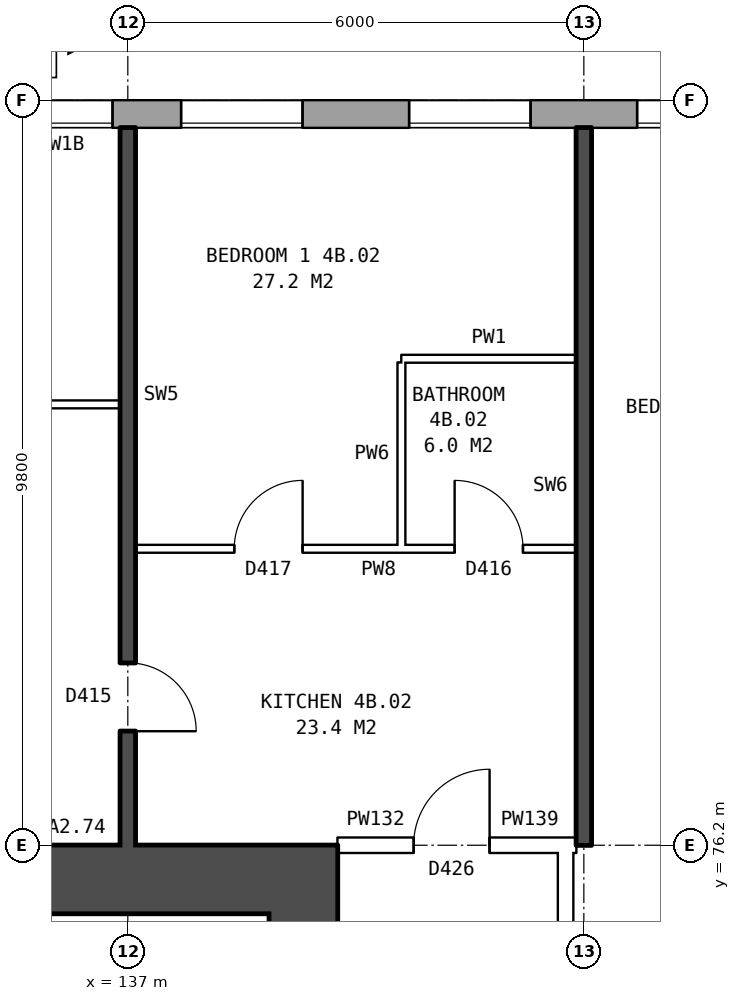
"""IFC4 building model, lengths in metres.
Left out: names, types, materials, properties, quantities, classifications, styles, units other than length and angle.
Written with IfcOpenShell. Run it as: python <this file> out.ifc"""

import sys

from ifc_helpers import new_model, si_unit, direction, frame, frame_2d, origin, place, context, subcontext, project, spatial, rectangle, extrude, element, fill, save


model = new_model("IFC4")
c1 = context("Model", 3, precision=1e-05, world=origin(), true_north=direction((0.0, 1.0)))
c2 = subcontext(c1, "Body", "Model", "MODEL_VIEW")
j1 = project(units=[si_unit("LENGTHUNIT", "METRE"), si_unit("PLANEANGLEUNIT", "RADIAN")], contexts=[c1])
p1 = place(None, origin())
s1 = spatial("IfcSite", under=j1, at=p1, CompositionType="ELEMENT")
p2 = place(p1, origin())
s2 = spatial("IfcBuilding", under=s1, at=p2, CompositionType="ELEMENT")
p3 = place(p2, frame((0.0, 0.0, 19.5)))
s3 = spatial("IfcBuildingStorey", under=s2, at=p3, CompositionType="ELEMENT", Elevation=19.5)
p4 = place(p3, frame((174.675, 85.82, 0.0), z_axis=(0.0, 0.0, 1.0), x_axis=(-1.0, 0.0, 0.0)))
e1 = element("IfcWall", 1, at=p4, inside=s3, PredefinedType="STANDARD", context=c2, shape_type="SweptSolid", body=[
    extrude(rectangle(XDim=40.601, YDim=0.36, at=frame_2d((20.3, 0.0))), origin(), (0.0, 0.0, 1.0), 2.85),
])
p5 = place(p4, frame((2.375, 0.0, 0.8)))
e2 = element("IfcOpeningElement", 2, at=p5, cuts=e1, PredefinedType="OPENING", context=c2, shape_type="SweptSolid", body=[
    extrude(rectangle(XDim=1.6, YDim=1.8, at=frame_2d((0.8, 0.9))), frame((0.0, 0.19, 0.0), z_axis=(0.0, -1.0, 0.0), x_axis=(1.0, 0.0, 0.0)), (0.0, 0.0, 1.0), 0.38),
])
p6 = place(p4, frame((5.375, 0.0, 0.8)))
e3 = element("IfcOpeningElement", 3, at=p6, cuts=e1, PredefinedType="OPENING", context=c2, shape_type="SweptSolid", body=[
    extrude(rectangle(XDim=1.6, YDim=1.8, at=frame_2d((0.8, 0.9))), frame((0.0, 0.19, 0.0), z_axis=(0.0, -1.0, 0.0), x_axis=(1.0, 0.0, 0.0)), (0.0, 0.0, 1.0), 0.38),
])
p7 = place(p4, frame((8.375, 0.0, 0.8)))
e4 = element("IfcOpeningElement", 4, at=p7, cuts=e1, PredefinedType="OPENING", context=c2, shape_type="SweptSolid", body=[
    extrude(rectangle(XDim=1.6, YDim=1.8, at=frame_2d((0.8, 0.9))), frame((0.0, 0.19, 0.0), z_axis=(0.0, -1.0, 0.0), x_axis=(1.0, 0.0, 0.0)), (0.0, 0.0, 1.0), 0.38),
])
p8 = place(p4, frame((11.375, 0.0, 0.8)))
e5 = element("IfcOpeningElement", 5, at=p8, cuts=e1, PredefinedType="OPENING", context=c2, shape_type="SweptSolid", body=[
    extrude(rectangle(XDim=1.6, YDim=1.8, at=frame_2d((0.8, 0.9))), frame((0.0, 0.19, 0.0), z_axis=(0.0, -1.0, 0.0), x_axis=(1.0, 0.0, 0.0)), (0.0, 0.0, 1.0), 0.38),
])
p9 = place(p4, frame((14.375, 0.0, 0.8)))
e6 = element("IfcOpeningElement", 6, at=p9, cuts=e1, PredefinedType="OPENING", context=c2, shape_type="SweptSolid", body=[
    extrude(rectangle(XDim=1.6, YDim=1.8, at=frame_2d((0.8, 0.9))), frame((0.0, 0.19, 0.0), z_axis=(0.0, -1.0, 0.0), x_axis=(1.0, 0.0, 0.0)), (0.0, 0.0, 1.0), 0.38),
])
p10 = place(p4, frame((17.375, 0.0, 0.8)))
e7 = element("IfcOpeningElement", 7, at=p10, cuts=e1, PredefinedType="OPENING", context=c2, shape_type="SweptSolid", body=[
    extrude(rectangle(XDim=1.6, YDim=1.8, at=frame_2d((0.8, 0.9))), frame((0.0, 0.19, 0.0), z_axis=(0.0, -1.0, 0.0), x_axis=(1.0, 0.0, 0.0)), (0.0, 0.0, 1.0), 0.38),
])
p11 = place(p4, frame((20.375, 0.0, 0.8)))
e8 = element("IfcOpeningElement", 8, at=p11, cuts=e1, PredefinedType="OPENING", context=c2, shape_type="SweptSolid", body=[
    extrude(rectangle(XDim=1.6, YDim=1.8, at=frame_2d((0.8, 0.9))), frame((0.0, 0.19, 0.0), z_axis=(0.0, -1.0, 0.0), x_axis=(1.0, 0.0, 0.0)), (0.0, 0.0, 1.0), 0.38),
])
p12 = place(p4, frame((23.375, 0.0, 0.8)))
e9 = element("IfcOpeningElement", 9, at=p12, cuts=e1, PredefinedType="OPENING", context=c2, shape_type="SweptSolid", body=[
    extrude(rectangle(XDim=1.6, YDim=1.8, at=frame_2d((0.8, 0.9))), frame((0.0, 0.19, 0.0), z_axis=(0.0, -1.0, 0.0), x_axis=(1.0, 0.0, 0.0)), (0.0, 0.0, 1.0), 0.38),
])
p13 = place(p4, frame((26.375, 0.0, 0.8)))
e10 = element("IfcOpeningElement", 10, at=p13, cuts=e1, PredefinedType="OPENING", context=c2, shape_type="SweptSolid", body=[
    extrude(rectangle(XDim=1.6, YDim=1.8, at=frame_2d((0.8, 0.9))), frame((0.0, 0.19, 0.0), z_axis=(0.0, -1.0, 0.0), x_axis=(1.0, 0.0, 0.0)), (0.0, 0.0, 1.0), 0.38),
])
p14 = place(p4, frame((29.375, 0.0, 0.8)))
e11 = element("IfcOpeningElement", 11, at=p14, cuts=e1, PredefinedType="OPENING", context=c2, shape_type="SweptSolid", body=[
    extrude(rectangle(XDim=1.6, YDim=1.8, at=frame_2d((0.8, 0.9))), frame((0.0, 0.19, 0.0), z_axis=(0.0, -1.0, 0.0), x_axis=(1.0, 0.0, 0.0)), (0.0, 0.0, 1.0), 0.38),
])
p15 = place(p4, frame((32.375, 0.0, 0.8)))
e12 = element("IfcOpeningElement", 12, at=p15, cuts=e1, PredefinedType="OPENING", context=c2, shape_type="SweptSolid", body=[
    extrude(rectangle(XDim=1.6, YDim=1.8, at=frame_2d((0.8, 0.9))), frame((0.0, 0.19, 0.0), z_axis=(0.0, -1.0, 0.0), x_axis=(1.0, 0.0, 0.0)), (0.0, 0.0, 1.0), 0.38),
])
p16 = place(p4, frame((35.375, 0.0, 0.8)))
e13 = element("IfcOpeningElement", 13, at=p16, cuts=e1, PredefinedType="OPENING", context=c2, shape_type="SweptSolid", body=[
    extrude(rectangle(XDim=1.6, YDim=1.8, at=frame_2d((0.8, 0.9))), frame((0.0, 0.19, 0.0), z_axis=(0.0, -1.0, 0.0), x_axis=(1.0, 0.0, 0.0)), (0.0, 0.0, 1.0), 0.38),
])
p17 = place(p4, frame((37.875, 0.0, 0.8)))
e14 = element("IfcOpeningElement", 14, at=p17, cuts=e1, PredefinedType="OPENING", context=c2, shape_type="SweptSolid", body=[
    extrude(rectangle(XDim=1.2, YDim=1.8, at=frame_2d((0.6, 0.9))), frame((0.0, 0.19, 0.0), z_axis=(0.0, -1.0, 0.0), x_axis=(1.0, 0.0, 0.0)), (0.0, 0.0, 1.0), 0.38),
])
p18 = place(p4, frame((39.375, 0.0, 0.8)))
e15 = element("IfcOpeningElement", 15, at=p18, cuts=e1, PredefinedType="OPENING", context=c2, shape_type="SweptSolid", body=[
    extrude(rectangle(XDim=0.6, YDim=1.2, at=frame_2d((0.3, 0.6))), frame((0.0, 0.19, 0.0), z_axis=(0.0, -1.0, 0.0), x_axis=(1.0, 0.0, 0.0)), (0.0, 0.0, 1.0), 0.38),
])
p19 = place(p3, frame((139.31, 64.7, 0.0), z_axis=(0.0, 0.0, 1.0), x_axis=(0.0, 1.0, 0.0)))
e16 = element("IfcWall", 16, at=p19, inside=s3, PredefinedType="SHEAR", context=c2, shape_type="SweptSolid", body=[
    extrude(rectangle(XDim=10.6, YDim=0.9, at=frame_2d((5.3, 0.0))), origin(), (0.0, 0.0, 1.0), 2.85),
])
p20 = place(p19, frame((0.425, 0.0, 0.0)))
e17 = element("IfcOpeningElement", 17, at=p20, cuts=e16, PredefinedType="OPENING", context=c2, shape_type="SweptSolid", body=[
    extrude(rectangle(XDim=1.1, YDim=2.1, at=frame_2d((0.55, 1.05))), frame((0.0, 0.46, 0.0), z_axis=(0.0, -1.0, 0.0), x_axis=(1.0, 0.0, 0.0)), (0.0, 0.0, 1.0), 0.92),
])
p21 = place(p19, frame((9.0, 0.0, 0.0)))
e18 = element("IfcOpeningElement", 18, at=p21, cuts=e16, PredefinedType="OPENING", context=c2, shape_type="SweptSolid", body=[
    extrude(rectangle(XDim=1.1, YDim=2.1, at=frame_2d((0.55, 1.05))), frame((0.0, 0.46, 0.0), z_axis=(0.0, -1.0, 0.0), x_axis=(1.0, 0.0, 0.0)), (0.0, 0.0, 1.0), 0.92),
])
p22 = place(p19, frame((7.225, 0.0, 0.0)))
e19 = element("IfcOpeningElement", 19, at=p22, cuts=e16, PredefinedType="OPENING", context=c2, shape_type="SweptSolid", body=[
    extrude(rectangle(XDim=0.85, YDim=2.1, at=frame_2d((0.425, 1.05))), frame((0.0, 0.46, 0.0), z_axis=(0.0, -1.0, 0.0), x_axis=(1.0, 0.0, 0.0)), (0.0, 0.0, 1.0), 0.92),
])
p23 = place(p3, frame((139.76, 75.75, 0.0), z_axis=(0.0, 0.0, 1.0), x_axis=(-1.0, 0.0, 0.0)))
e20 = element("IfcWall", 20, at=p23, inside=s3, PredefinedType="SHEAR", context=c2, shape_type="SweptSolid", body=[
    extrude(rectangle(XDim=8.4, YDim=0.9, at=frame_2d((4.2, 0.0))), origin(), (0.0, 0.0, 1.0), 2.85),
])
p24 = place(p3, frame((142.76, 63.9, 0.0), z_axis=(0.0, 0.0, 1.0), x_axis=(0.0, 1.0, 0.0)))
e21 = element("IfcWall", 21, at=p24, inside=s3, PredefinedType="PARTITIONING", context=c2, shape_type="SweptSolid", body=[
    extrude(rectangle(XDim=12.2, YDim=0.2, at=frame_2d((6.1, 0.0))), origin(), (0.0, 0.0, 1.0), 2.85),
])
p25 = place(p24, frame((5.1, 0.0, 0.0)))
e22 = element("IfcOpeningElement", 22, at=p25, cuts=e21, PredefinedType="OPENING", context=c2, shape_type="SweptSolid", body=[
    extrude(rectangle(XDim=2.0, YDim=2.1, at=frame_2d((1.0, 1.05))), frame((0.0, 0.11, 0.0), z_axis=(0.0, -1.0, 0.0), x_axis=(1.0, 0.0, 0.0)), (0.0, 0.0, 1.0), 0.22),
])
p26 = place(p3, frame((139.76, 76.2, 0.0), z_axis=(0.0, 0.0, 1.0), x_axis=(1.0, 0.0, 0.0)))
e23 = element("IfcWall", 23, at=p26, inside=s3, PredefinedType="PARTITIONING", context=c2, shape_type="SweptSolid", body=[
    extrude(rectangle(XDim=3.0, YDim=0.2, at=frame_2d((1.5, 0.0))), origin(), (0.0, 0.0, 1.0), 2.85),
])
p27 = place(p26, frame((1.0, 0.0, 0.0)))
e24 = element("IfcOpeningElement", 24, at=p27, cuts=e23, PredefinedType="OPENING", context=c2, shape_type="SweptSolid", body=[
    extrude(rectangle(XDim=1.0, YDim=2.1, at=frame_2d((0.5, 1.05))), frame((0.0, 0.11, 0.0), z_axis=(0.0, -1.0, 0.0), x_axis=(1.0, 0.0, 0.0)), (0.0, 0.0, 1.0), 0.22),
])
p28 = place(p3, frame((142.76, 76.2, 0.0), z_axis=(0.0, 0.0, 1.0), x_axis=(1.0, 0.0, 0.0)))
e25 = element("IfcWall", 25, at=p28, inside=s3, PredefinedType="PARTITIONING", context=c2, shape_type="SweptSolid", body=[
    extrude(rectangle(XDim=0.14, YDim=0.2, at=frame_2d((0.07, 0.0))), origin(), (0.0, 0.0, 1.0), 2.85),
])
p29 = place(p3, frame((137.1, 80.1, 0.0), z_axis=(0.0, 0.0, 1.0), x_axis=(1.0, 0.0, 0.0)))
e26 = element("IfcWall", 26, at=p29, inside=s3, PredefinedType="PARTITIONING", context=c2, shape_type="SweptSolid", body=[
    extrude(rectangle(XDim=5.8, YDim=0.1, at=frame_2d((2.9, 0.0))), origin(), (0.0, 0.0, 1.0), 2.85),
])
p30 = place(p29, frame((1.3, 0.0, 0.0)))
e27 = element("IfcOpeningElement", 27, at=p30, cuts=e26, PredefinedType="OPENING", context=c2, shape_type="SweptSolid", body=[
    extrude(rectangle(XDim=0.9, YDim=2.1, at=frame_2d((0.45, 1.05))), frame((0.0, 0.06, 0.0), z_axis=(0.0, -1.0, 0.0), x_axis=(1.0, 0.0, 0.0)), (0.0, 0.0, 1.0), 0.12),
])
p31 = place(p29, frame((4.2, 0.0, 0.0)))
e28 = element("IfcOpeningElement", 28, at=p31, cuts=e26, PredefinedType="OPENING", context=c2, shape_type="SweptSolid", body=[
    extrude(rectangle(XDim=0.9, YDim=2.1, at=frame_2d((0.45, 1.05))), frame((0.0, 0.06, 0.0), z_axis=(0.0, -1.0, 0.0), x_axis=(1.0, 0.0, 0.0)), (0.0, 0.0, 1.0), 0.12),
])
p32 = place(p3, frame((131.36, 82.0, 0.0), z_axis=(0.0, 0.0, 1.0), x_axis=(1.0, 0.0, 0.0)))
e29 = element("IfcWall", 29, at=p32, inside=s3, PredefinedType="PARTITIONING", context=c2, shape_type="SweptSolid", body=[
    extrude(rectangle(XDim=5.54, YDim=0.1, at=frame_2d((2.77, 0.0))), origin(), (0.0, 0.0, 1.0), 2.85),
])
p33 = place(p32, frame((2.32, 0.0, 0.0)))
e30 = element("IfcOpeningElement", 30, at=p33, cuts=e29, PredefinedType="OPENING", context=c2, shape_type="SweptSolid", body=[
    extrude(rectangle(XDim=0.9, YDim=2.1, at=frame_2d((0.45, 1.05))), frame((0.0, 0.06, 0.0), z_axis=(0.0, -1.0, 0.0), x_axis=(1.0, 0.0, 0.0)), (0.0, 0.0, 1.0), 0.12),
])
p34 = place(p3, frame((140.6, 82.6, 0.0), z_axis=(0.0, 0.0, 1.0), x_axis=(1.0, 0.0, 0.0)))
e31 = element("IfcWall", 31, at=p34, inside=s3, PredefinedType="PARTITIONING", context=c2, shape_type="SweptSolid", body=[
    extrude(rectangle(XDim=2.3, YDim=0.1, at=frame_2d((1.15, 0.0))), origin(), (0.0, 0.0, 1.0), 2.85),
])
p35 = place(p3, frame((137.0, 76.2, 0.0), z_axis=(0.0, 0.0, 1.0), x_axis=(0.0, 1.0, 0.0)))
e32 = element("IfcWall", 32, at=p35, inside=s3, PredefinedType="SOLIDWALL", context=c2, shape_type="SweptSolid", body=[
    extrude(rectangle(XDim=9.44, YDim=0.2, at=frame_2d((4.72, 0.0))), origin(), (0.0, 0.0, 1.0), 2.85),
])
p36 = place(p35, frame((1.5, 0.0, 0.0)))
e33 = element("IfcOpeningElement", 33, at=p36, cuts=e32, PredefinedType="OPENING", context=c2, shape_type="SweptSolid", body=[
    extrude(rectangle(XDim=0.9, YDim=2.1, at=frame_2d((0.45, 1.05))), frame((0.0, 0.11, 0.0), z_axis=(0.0, -1.0, 0.0), x_axis=(1.0, 0.0, 0.0)), (0.0, 0.0, 1.0), 0.22),
])
p37 = place(p3, frame((140.6, 80.15, 0.0), z_axis=(0.0, 0.0, 1.0), x_axis=(0.0, 1.0, 0.0)))
e34 = element("IfcWall", 34, at=p37, inside=s3, PredefinedType="PARTITIONING", context=c2, shape_type="SweptSolid", body=[
    extrude(rectangle(XDim=2.4, YDim=0.1, at=frame_2d((1.2, 0.0))), origin(), (0.0, 0.0, 1.0), 2.85),
])
p38 = place(p3, frame((143.0, 76.2, 0.0), z_axis=(0.0, 0.0, 1.0), x_axis=(0.0, 1.0, 0.0)))
e35 = element("IfcWall", 35, at=p38, inside=s3, PredefinedType="SOLIDWALL", context=c2, shape_type="SweptSolid", body=[
    extrude(rectangle(XDim=9.44, YDim=0.2, at=frame_2d((4.72, 0.0))), origin(), (0.0, 0.0, 1.0), 2.85),
])
p39 = place(p14, origin())
e36 = element("IfcWindow", 36, at=p39, inside=s3, PartitioningType="SINGLE_PANEL", PredefinedType="WINDOW", context=c2, shape_type="SweptSolid", body=[
    extrude(rectangle(XDim=1.6, YDim=1.8, at=frame_2d((0.8, 0.9))), frame((0.0, 0.15, 0.0), z_axis=(0.0, -1.0, 0.0), x_axis=(1.0, 0.0, 0.0)), (0.0, 0.0, 1.0), 0.06),
])
fill(e11, e36)
p40 = place(p15, origin())
e37 = element("IfcWindow", 37, at=p40, inside=s3, PartitioningType="SINGLE_PANEL", PredefinedType="WINDOW", context=c2, shape_type="SweptSolid", body=[
    extrude(rectangle(XDim=1.6, YDim=1.8, at=frame_2d((0.8, 0.9))), frame((0.0, 0.15, 0.0), z_axis=(0.0, -1.0, 0.0), x_axis=(1.0, 0.0, 0.0)), (0.0, 0.0, 1.0), 0.06),
])
fill(e12, e37)
p41 = place(p16, origin())
e38 = element("IfcWindow", 38, at=p41, inside=s3, PartitioningType="SINGLE_PANEL", PredefinedType="WINDOW", context=c2, shape_type="SweptSolid", body=[
    extrude(rectangle(XDim=1.6, YDim=1.8, at=frame_2d((0.8, 0.9))), frame((0.0, 0.15, 0.0), z_axis=(0.0, -1.0, 0.0), x_axis=(1.0, 0.0, 0.0)), (0.0, 0.0, 1.0), 0.06),
])
fill(e13, e38)
p42 = place(p17, origin())
e39 = element("IfcWindow", 39, at=p42, inside=s3, PartitioningType="SINGLE_PANEL", PredefinedType="WINDOW", context=c2, shape_type="SweptSolid", body=[
    extrude(rectangle(XDim=1.2, YDim=1.8, at=frame_2d((0.6, 0.9))), frame((0.0, 0.15, 0.0), z_axis=(0.0, -1.0, 0.0), x_axis=(1.0, 0.0, 0.0)), (0.0, 0.0, 1.0), 0.06),
])
fill(e14, e39)
p43 = place(p30, origin())
e40 = element("IfcDoor", 40, at=p43, inside=s3, OperationType="SINGLE_SWING_RIGHT", PredefinedType="DOOR", context=c2, shape_type="SweptSolid", body=[
    extrude(rectangle(XDim=0.9, YDim=2.1, at=frame_2d((0.45, 1.05))), frame((0.0, 0.025, 0.0), z_axis=(0.0, -1.0, 0.0), x_axis=(1.0, 0.0, 0.0)), (0.0, 0.0, 1.0), 0.05),
])
fill(e27, e40)
p44 = place(p27, origin())
e41 = element("IfcDoor", 41, at=p44, inside=s3, OperationType="SINGLE_SWING_RIGHT", PredefinedType="DOOR", context=c2, shape_type="SweptSolid", body=[
    extrude(rectangle(XDim=1.0, YDim=2.1, at=frame_2d((0.5, 1.05))), frame((0.0, 0.025, 0.0), z_axis=(0.0, -1.0, 0.0), x_axis=(1.0, 0.0, 0.0)), (0.0, 0.0, 1.0), 0.05),
])
fill(e24, e41)
p45 = place(p36, frame((0.9, 0.0, 0.0), z_axis=(0.0, 0.0, 1.0), x_axis=(-1.0, 0.0, 0.0)))
e42 = element("IfcDoor", 42, at=p45, inside=s3, OperationType="SINGLE_SWING_RIGHT", PredefinedType="DOOR", context=c2, shape_type="SweptSolid", body=[
    extrude(rectangle(XDim=0.9, YDim=2.1, at=frame_2d((0.45, 1.05))), frame((0.0, 0.025, 0.0), z_axis=(0.0, -1.0, 0.0), x_axis=(1.0, 0.0, 0.0)), (0.0, 0.0, 1.0), 0.05),
])
fill(e33, e42)
p46 = place(p31, origin())
e43 = element("IfcDoor", 43, at=p46, inside=s3, OperationType="SINGLE_SWING_LEFT", PredefinedType="DOOR", context=c2, shape_type="SweptSolid", body=[
    extrude(rectangle(XDim=0.9, YDim=2.1, at=frame_2d((0.45, 1.05))), frame((0.0, 0.025, 0.0), z_axis=(0.0, -1.0, 0.0), x_axis=(1.0, 0.0, 0.0)), (0.0, 0.0, 1.0), 0.05),
])
fill(e28, e43)
save(model, sys.argv[1])
